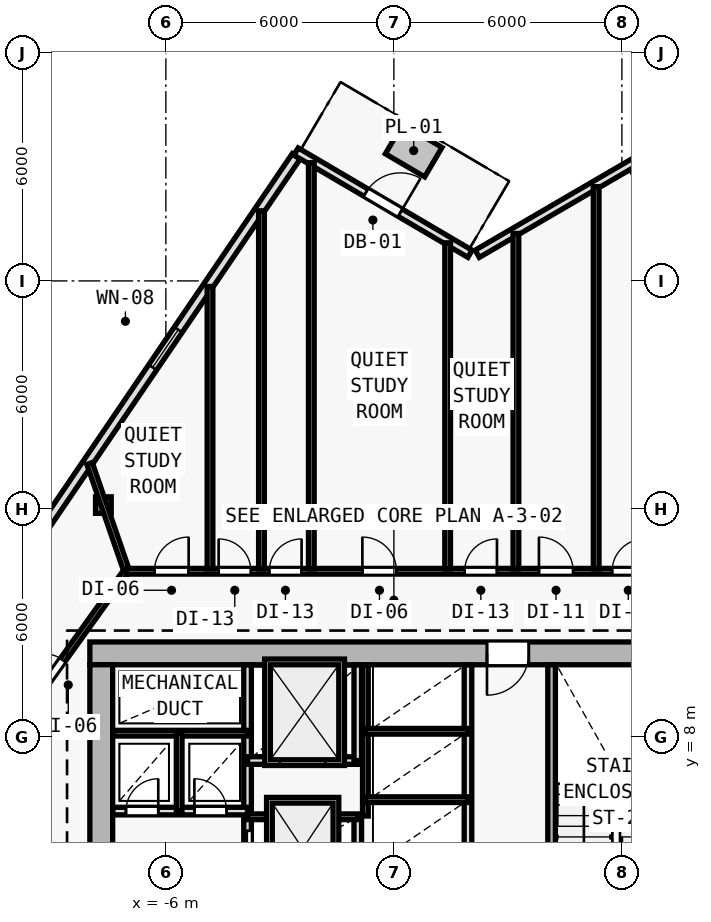
"""IFC4 building model, lengths in metres.
Left out: names, types, materials, properties, quantities, classifications, styles, units other than length and angle.
Written with IfcOpenShell. Run it as: python <this file> out.ifc"""

import sys

from ifc_helpers import new_model, si_unit, direction, frame, frame_2d, origin, origin_2d, place, context, subcontext, project, spatial, rectangle, i_section, extrude, element, fill, save


model = new_model("IFC4")
c1 = context("Model", 3, precision=1e-05, world=origin(), true_north=direction((0.0, 1.0)))
c2 = subcontext(c1, "Body", "Model", "MODEL_VIEW")
j1 = project(units=[si_unit("LENGTHUNIT", "METRE"), si_unit("PLANEANGLEUNIT", "RADIAN")], contexts=[c1])
p1 = place(None, origin())
s1 = spatial("IfcSite", under=j1, at=p1, CompositionType="ELEMENT")
p2 = place(p1, origin())
s2 = spatial("IfcBuilding", under=s1, at=p2, CompositionType="ELEMENT")
p3 = place(p2, frame((0.0, 0.0, 66.0)))
s3 = spatial("IfcBuildingStorey", under=s2, at=p3, CompositionType="ELEMENT", Elevation=66.0)
p4 = place(p3, frame((-7.7, 10.2, 0.0), z_axis=(0.0, 0.0, 1.0), x_axis=(1.0, 0.0, 0.0)))
e1 = element("IfcColumn", 1, at=p4, inside=s3, PredefinedType="COLUMN", context=c2, shape_type="SweptSolid", body=[
    extrude(i_section(OverallWidth=0.416, OverallDepth=0.446, WebThickness=0.025, FlangeThickness=0.04, FilletRadius=0.015, at=origin_2d()), origin(), (0.0, 0.0, 1.0), 3.6),
])
p5 = place(p3, frame((-7.644, 14.101, 0.006), z_axis=(0.008843162072, -0.002584924298, 0.999957557425), x_axis=(0.280566991813, 0.959834445675, 0.0)))
e2 = element("IfcColumn", 2, at=p5, inside=s3, PredefinedType="COLUMN", context=c2, shape_type="SweptSolid", body=[
    extrude(i_section(OverallWidth=0.412, OverallDepth=0.435, WebThickness=0.023, FlangeThickness=0.037, FilletRadius=0.015, at=origin_2d()), origin(), (0.0, 0.0, 1.0), 3.589),
])
p6 = place(p3, frame((6.328, 23.006, 0.0), z_axis=(0.0, 0.0, 1.0), x_axis=(0.511075811474, -0.859535639125, 0.0)))
e3 = element("IfcWall", 3, at=p6, inside=s3, PredefinedType="SOLIDWALL", context=c2, shape_type="SweptSolid", body=[
    extrude(rectangle(XDim=11.646, YDim=0.25, at=frame_2d((5.823, 0.0))), origin(), (0.0, 0.0, 1.0), 3.35),
])
p7 = place(p6, frame((5.023, 0.0, 0.62)))
e4 = element("IfcOpeningElement", 4, at=p7, cuts=e3, PredefinedType="OPENING", context=c2, shape_type="SweptSolid", body=[
    extrude(rectangle(XDim=1.6, YDim=2.1, at=frame_2d((0.8, 1.05))), frame((0.0, 0.135, 0.0), z_axis=(0.0, -1.0, 0.0), x_axis=(1.0, 0.0, 0.0)), (0.0, 0.0, 1.0), 0.27),
])
p8 = place(p3, frame((-9.451, 13.163, 0.0), z_axis=(0.0, 0.0, 1.0), x_axis=(0.562478152622, 0.826812147844, 0.0)))
e5 = element("IfcWall", 5, at=p8, inside=s3, PredefinedType="SOLIDWALL", context=c2, shape_type="SweptSolid", body=[
    extrude(rectangle(XDim=12.232, YDim=0.25, at=frame_2d((6.116, 0.0))), origin(), (0.0, 0.0, 1.0), 3.35),
])
p9 = place(p8, frame((5.516, 0.0, 0.62)))
e6 = element("IfcOpeningElement", 6, at=p9, cuts=e5, PredefinedType="OPENING", context=c2, shape_type="SweptSolid", body=[
    extrude(rectangle(XDim=1.2, YDim=1.8, at=frame_2d((0.6, 0.9))), frame((0.0, 0.135, 0.0), z_axis=(0.0, -1.0, 0.0), x_axis=(1.0, 0.0, 0.0)), (0.0, 0.0, 1.0), 0.27),
])
p10 = place(p3, frame((2.193, 20.713, 0.0), z_axis=(0.0, 0.0, 1.0), x_axis=(0.863964978951, 0.503551899159, 0.0)))
e7 = element("IfcWall", 7, at=p10, inside=s3, PredefinedType="SOLIDWALL", context=c2, shape_type="SweptSolid", body=[
    extrude(rectangle(XDim=4.805, YDim=0.22, at=frame_2d((2.402, 0.0))), origin(), (0.0, 0.0, 1.0), 3.35),
])
p11 = place(p3, frame((-2.572, 23.403, 0.0), z_axis=(0.0, 0.0, 1.0), x_axis=(0.862137551275, -0.506674296449, 0.0)))
e8 = element("IfcWall", 8, at=p11, inside=s3, PredefinedType="SOLIDWALL", context=c2, shape_type="SweptSolid", body=[
    extrude(rectangle(XDim=5.307, YDim=0.22, at=frame_2d((2.654, 0.0))), origin(), (0.0, 0.0, 1.0), 3.35),
])
p12 = place(p11, frame((2.128, 0.0, 0.0)))
e9 = element("IfcOpeningElement", 9, at=p12, cuts=e8, PredefinedType="OPENING", context=c2, shape_type="SweptSolid", body=[
    extrude(rectangle(XDim=1.05, YDim=2.15, at=frame_2d((0.525, 1.075))), frame((0.0, 0.12, 0.0), z_axis=(0.0, -1.0, 0.0), x_axis=(1.0, 0.0, 0.0)), (0.0, 0.0, 1.0), 0.24),
])
p13 = place(p3, frame((8.0, 10.2, 0.0), z_axis=(0.0, 0.0, 1.0), x_axis=(-1.0, 0.0, 0.0)))
e10 = element("IfcWall", 10, at=p13, inside=s3, PredefinedType="SHEAR", context=c2, shape_type="SweptSolid", body=[
    extrude(rectangle(XDim=16.0, YDim=0.6, at=frame_2d((8.0, 0.0))), origin(), (0.0, 0.0, 1.0), 3.35),
])
p14 = place(p13, frame((4.45, 0.0, 0.0)))
e11 = element("IfcOpeningElement", 11, at=p14, cuts=e10, PredefinedType="OPENING", context=c2, shape_type="SweptSolid", body=[
    extrude(rectangle(XDim=1.1, YDim=2.15, at=frame_2d((0.55, 1.075))), frame((0.0, 0.31, 0.0), z_axis=(0.0, -1.0, 0.0), x_axis=(1.0, 0.0, 0.0)), (0.0, 0.0, 1.0), 0.62),
])
p15 = place(p3, frame((-7.7, -9.1, 0.0), z_axis=(0.0, 0.0, 1.0), x_axis=(0.0, 1.0, 0.0)))
e12 = element("IfcWall", 12, at=p15, inside=s3, PredefinedType="SHEAR", context=c2, shape_type="SweptSolid", body=[
    extrude(rectangle(XDim=19.0, YDim=0.6, at=frame_2d((9.5, 0.0))), origin(), (0.0, 0.0, 1.0), 3.35),
])
p16 = place(p15, frame((12.65, 0.0, 0.0)))
e13 = element("IfcOpeningElement", 13, at=p16, cuts=e12, PredefinedType="OPENING", context=c2, shape_type="SweptSolid", body=[
    extrude(rectangle(XDim=1.1, YDim=2.15, at=frame_2d((0.55, 1.075))), frame((0.0, 0.31, 0.0), z_axis=(0.0, -1.0, 0.0), x_axis=(1.0, 0.0, 0.0)), (0.0, 0.0, 1.0), 0.62),
])
p17 = place(p3, frame((-3.85, 1.35, 0.0), z_axis=(0.0, 0.0, 1.0), x_axis=(0.0, 1.0, 0.0)))
e14 = element("IfcWall", 14, at=p17, inside=s3, PredefinedType="SOLIDWALL", context=c2, shape_type="SweptSolid", body=[
    extrude(rectangle(XDim=8.545, YDim=0.2, at=frame_2d((4.272, 0.0))), origin(), (0.0, 0.0, 1.0), 3.35),
])
p18 = place(p17, frame((1.5, 0.0, 0.0)))
e15 = element("IfcOpeningElement", 15, at=p18, cuts=e14, PredefinedType="OPENING", context=c2, shape_type="SweptSolid", body=[
    extrude(rectangle(XDim=1.0, YDim=2.15, at=frame_2d((0.5, 1.075))), frame((0.0, 0.11, 0.0), z_axis=(0.0, -1.0, 0.0), x_axis=(1.0, 0.0, 0.0)), (0.0, 0.0, 1.0), 0.22),
])
p19 = place(p17, frame((3.18, 0.0, 0.0)))
e16 = element("IfcOpeningElement", 16, at=p19, cuts=e14, PredefinedType="OPENING", context=c2, shape_type="SweptSolid", body=[
    extrude(rectangle(XDim=1.0, YDim=2.15, at=frame_2d((0.5, 1.075))), frame((0.0, 0.11, 0.0), z_axis=(0.0, -1.0, 0.0), x_axis=(1.0, 0.0, 0.0)), (0.0, 0.0, 1.0), 0.22),
])
p20 = place(p3, frame((-7.395, 6.05, 0.0), z_axis=(0.0, 0.0, 1.0), x_axis=(1.0, 0.0, 0.0)))
e17 = element("IfcWall", 17, at=p20, inside=s3, PredefinedType="SOLIDWALL", context=c2, shape_type="SweptSolid", body=[
    extrude(rectangle(XDim=3.545, YDim=0.2, at=frame_2d((1.772, 0.0))), origin(), (0.0, 0.0, 1.0), 3.35),
])
p21 = place(p20, frame((0.345, 0.0, 0.0)))
e18 = element("IfcOpeningElement", 18, at=p21, cuts=e17, PredefinedType="OPENING", context=c2, shape_type="SweptSolid", body=[
    extrude(rectangle(XDim=0.85, YDim=2.1, at=frame_2d((0.425, 1.05))), frame((0.0, 0.11, 0.0), z_axis=(0.0, -1.0, 0.0), x_axis=(1.0, 0.0, 0.0)), (0.0, 0.0, 1.0), 0.22),
])
p22 = place(p20, frame((2.145, 0.0, 0.0)))
e19 = element("IfcOpeningElement", 19, at=p22, cuts=e17, PredefinedType="OPENING", context=c2, shape_type="SweptSolid", body=[
    extrude(rectangle(XDim=0.85, YDim=2.1, at=frame_2d((0.425, 1.05))), frame((0.0, 0.11, 0.0), z_axis=(0.0, -1.0, 0.0), x_axis=(1.0, 0.0, 0.0)), (0.0, 0.0, 1.0), 0.22),
])
p23 = place(p3, frame((-7.395, 8.1, 0.0), z_axis=(0.0, 0.0, 1.0), x_axis=(1.0, 0.0, 0.0)))
e20 = element("IfcWall", 20, at=p23, inside=s3, PredefinedType="PARTITIONING", context=c2, shape_type="SweptSolid", body=[
    extrude(rectangle(XDim=3.545, YDim=0.15, at=frame_2d((1.772, 0.0))), origin(), (0.0, 0.0, 1.0), 3.35),
])
p24 = place(p3, frame((-5.65, 6.05, 0.0), z_axis=(0.0, 0.0, 1.0), x_axis=(0.0, 1.0, 0.0)))
e21 = element("IfcWall", 21, at=p24, inside=s3, PredefinedType="PARTITIONING", context=c2, shape_type="SweptSolid", body=[
    extrude(rectangle(XDim=2.05, YDim=0.15, at=frame_2d((1.025, 0.0))), origin(), (0.0, 0.0, 1.0), 3.35),
])
p25 = place(p3, frame((4.15, 2.75, 0.0), z_axis=(0.0, 0.0, 1.0), x_axis=(0.0, 1.0, 0.0)))
e22 = element("IfcWall", 22, at=p25, inside=s3, PredefinedType="SOLIDWALL", context=c2, shape_type="SweptSolid", body=[
    extrude(rectangle(XDim=7.15, YDim=0.2, at=frame_2d((3.575, 0.0))), origin(), (0.0, 0.0, 1.0), 3.35),
])
p26 = place(p25, frame((0.35, 0.0, 0.0)))
e23 = element("IfcOpeningElement", 23, at=p26, cuts=e22, PredefinedType="OPENING", context=c2, shape_type="SweptSolid", body=[
    extrude(rectangle(XDim=1.0, YDim=2.15, at=frame_2d((0.5, 1.075))), frame((0.0, 0.11, 0.0), z_axis=(0.0, -1.0, 0.0), x_axis=(1.0, 0.0, 0.0)), (0.0, 0.0, 1.0), 0.22),
])
p27 = place(p3, frame((-0.95, 2.65, 0.0), z_axis=(0.0, 0.0, 1.0), x_axis=(0.0, 1.0, 0.0)))
e24 = element("IfcWall", 24, at=p27, inside=s3, PredefinedType="SOLIDWALL", context=c2, shape_type="SweptSolid", body=[
    extrude(rectangle(XDim=3.27, YDim=0.2, at=frame_2d((1.635, 0.0))), origin(), (0.0, 0.0, 1.0), 3.35),
])
p28 = place(p3, frame((-3.85, 5.9, 0.0), z_axis=(0.0, 0.0, 1.0), x_axis=(1.0, 0.0, 0.0)))
e25 = element("IfcWall", 25, at=p28, inside=s3, PredefinedType="PARTITIONING", context=c2, shape_type="SweptSolid", body=[
    extrude(rectangle(XDim=2.9, YDim=0.15, at=frame_2d((1.45, 0.0))), origin(), (0.0, 0.0, 1.0), 3.35),
])
p29 = place(p3, frame((-3.85, 7.38, 0.0), z_axis=(0.0, 0.0, 1.0), x_axis=(1.0, 0.0, 0.0)))
e26 = element("IfcWall", 26, at=p29, inside=s3, PredefinedType="SOLIDWALL", context=c2, shape_type="SweptSolid", body=[
    extrude(rectangle(XDim=2.9, YDim=0.2, at=frame_2d((1.45, 0.0))), origin(), (0.0, 0.0, 1.0), 3.35),
])
p30 = place(p29, frame((0.85, 0.0, 0.0)))
e27 = element("IfcOpeningElement", 27, at=p30, cuts=e26, PredefinedType="OPENING", context=c2, shape_type="SweptSolid", body=[
    extrude(rectangle(XDim=1.2, YDim=2.2, at=frame_2d((0.6, 1.1))), frame((0.0, 0.11, 0.0), z_axis=(0.0, -1.0, 0.0), x_axis=(1.0, 0.0, 0.0)), (0.0, 0.0, 1.0), 0.22),
])
p31 = place(p3, frame((-0.95, 7.38, 0.0), z_axis=(0.0, 0.0, 1.0), x_axis=(0.0, 1.0, 0.0)))
e28 = element("IfcWall", 28, at=p31, inside=s3, PredefinedType="SOLIDWALL", context=c2, shape_type="SweptSolid", body=[
    extrude(rectangle(XDim=2.515, YDim=0.2, at=frame_2d((1.258, 0.0))), origin(), (0.0, 0.0, 1.0), 3.35),
])
p32 = place(p3, frame((1.95, 2.65, 0.0), z_axis=(0.0, 0.0, 1.0), x_axis=(0.0, 1.0, 0.0)))
e29 = element("IfcWall", 29, at=p32, inside=s3, PredefinedType="SOLIDWALL", context=c2, shape_type="SweptSolid", body=[
    extrude(rectangle(XDim=7.245, YDim=0.2, at=frame_2d((3.623, 0.0))), origin(), (0.0, 0.0, 1.0), 3.35),
])
p33 = place(p3, frame((-0.75, 5.92, 0.0), z_axis=(0.0, 0.0, 1.0), x_axis=(0.0, 1.0, 0.0)))
e30 = element("IfcWall", 30, at=p33, inside=s3, PredefinedType="PARTITIONING", context=c2, shape_type="SweptSolid", body=[
    extrude(rectangle(XDim=3.975, YDim=0.15, at=frame_2d((1.988, 0.0))), origin(), (0.0, 0.0, 1.0), 3.35),
])
for number, where, z_axis, x_axis in (
    (31, (-0.75, 6.35, 0.0), (0.0, 0.0, 1.0), (1.0, 0.0, 0.0)),
    (32, (-0.75, 8.15, 0.0), (0.0, 0.0, 1.0), (1.0, 0.0, 0.0)),
):
    element("IfcWall", number, at=place(p3, frame(where, z_axis=z_axis, x_axis=x_axis)), inside=s3, PredefinedType="PARTITIONING", context=c2, shape_type="SweptSolid", body=[
        extrude(rectangle(XDim=2.7, YDim=0.15, at=frame_2d((1.35, 0.0))), origin(), (0.0, 0.0, 1.0), 3.35),
    ])
p34 = place(p3, frame((-9.86, 8.426, 0.0), z_axis=(0.0, 0.0, 1.0), x_axis=(0.582449511476, 0.812866881218, 0.0)))
e33 = element("IfcWall", 33, at=p34, inside=s3, PredefinedType="PARTITIONING", context=c2, shape_type="SweptSolid", body=[
    extrude(rectangle(XDim=4.84, YDim=0.15, at=frame_2d((2.42, 0.0))), origin(), (0.0, 0.0, 1.0), 2.725),
])
p35 = place(p34, frame((1.07, 0.0, 0.0)))
e34 = element("IfcOpeningElement", 34, at=p35, cuts=e33, PredefinedType="OPENING", context=c2, shape_type="SweptSolid", body=[
    extrude(rectangle(XDim=0.9, YDim=2.1, at=frame_2d((0.45, 1.05))), frame((0.0, 0.085, 0.0), z_axis=(0.0, -1.0, 0.0), x_axis=(1.0, 0.0, 0.0)), (0.0, 0.0, 1.0), 0.17),
])
p36 = place(p3, frame((-7.041, 12.36, 0.0), z_axis=(0.0, 0.0, 1.0), x_axis=(1.0, 0.0, 0.0)))
e35 = element("IfcWall", 35, at=p36, inside=s3, PredefinedType="PARTITIONING", context=c2, shape_type="SweptSolid", body=[
    extrude(rectangle(XDim=14.082, YDim=0.15, at=frame_2d((7.041, 0.0))), origin(), (0.0, 0.0, 1.0), 3.35),
])
p37 = place(p36, frame((12.784, 0.0, 0.0)))
e36 = element("IfcOpeningElement", 36, at=p37, cuts=e35, PredefinedType="OPENING", context=c2, shape_type="SweptSolid", body=[
    extrude(rectangle(XDim=0.85, YDim=2.1, at=frame_2d((0.425, 1.05))), frame((0.0, 0.085, 0.0), z_axis=(0.0, -1.0, 0.0), x_axis=(1.0, 0.0, 0.0)), (0.0, 0.0, 1.0), 0.17),
])
p38 = place(p36, frame((10.858, 0.0, 0.0)))
e37 = element("IfcOpeningElement", 37, at=p38, cuts=e35, PredefinedType="OPENING", context=c2, shape_type="SweptSolid", body=[
    extrude(rectangle(XDim=0.9, YDim=2.1, at=frame_2d((0.45, 1.05))), frame((0.0, 0.085, 0.0), z_axis=(0.0, -1.0, 0.0), x_axis=(1.0, 0.0, 0.0)), (0.0, 0.0, 1.0), 0.17),
])
p39 = place(p36, frame((8.904, 0.0, 0.0)))
e38 = element("IfcOpeningElement", 38, at=p39, cuts=e35, PredefinedType="OPENING", context=c2, shape_type="SweptSolid", body=[
    extrude(rectangle(XDim=0.85, YDim=2.1, at=frame_2d((0.425, 1.05))), frame((0.0, 0.085, 0.0), z_axis=(0.0, -1.0, 0.0), x_axis=(1.0, 0.0, 0.0)), (0.0, 0.0, 1.0), 0.17),
])
p40 = place(p36, frame((6.212, 0.0, 0.0)))
e39 = element("IfcOpeningElement", 39, at=p40, cuts=e35, PredefinedType="OPENING", context=c2, shape_type="SweptSolid", body=[
    extrude(rectangle(XDim=0.9, YDim=2.1, at=frame_2d((0.45, 1.05))), frame((0.0, 0.085, 0.0), z_axis=(0.0, -1.0, 0.0), x_axis=(1.0, 0.0, 0.0)), (0.0, 0.0, 1.0), 0.17),
])
p41 = place(p36, frame((3.763, 0.0, 0.0)))
e40 = element("IfcOpeningElement", 40, at=p41, cuts=e35, PredefinedType="OPENING", context=c2, shape_type="SweptSolid", body=[
    extrude(rectangle(XDim=0.85, YDim=2.1, at=frame_2d((0.425, 1.05))), frame((0.0, 0.085, 0.0), z_axis=(0.0, -1.0, 0.0), x_axis=(1.0, 0.0, 0.0)), (0.0, 0.0, 1.0), 0.17),
])
p42 = place(p36, frame((2.429, 0.0, 0.0)))
e41 = element("IfcOpeningElement", 41, at=p42, cuts=e35, PredefinedType="OPENING", context=c2, shape_type="SweptSolid", body=[
    extrude(rectangle(XDim=0.85, YDim=2.1, at=frame_2d((0.425, 1.05))), frame((0.0, 0.085, 0.0), z_axis=(0.0, -1.0, 0.0), x_axis=(1.0, 0.0, 0.0)), (0.0, 0.0, 1.0), 0.17),
])
p43 = place(p36, frame((0.74, 0.0, 0.0)))
e42 = element("IfcOpeningElement", 42, at=p43, cuts=e35, PredefinedType="OPENING", context=c2, shape_type="SweptSolid", body=[
    extrude(rectangle(XDim=0.9, YDim=2.1, at=frame_2d((0.45, 1.05))), frame((0.0, 0.085, 0.0), z_axis=(0.0, -1.0, 0.0), x_axis=(1.0, 0.0, 0.0)), (0.0, 0.0, 1.0), 0.17),
])
p44 = place(p3, frame((-7.047, 12.412, 0.0), z_axis=(0.0, 0.0, 1.0), x_axis=(-0.326108195871, 0.945332451884, 0.0)))
e43 = element("IfcWall", 43, at=p44, inside=s3, PredefinedType="PARTITIONING", context=c2, shape_type="SweptSolid", body=[
    extrude(rectangle(XDim=2.945, YDim=0.15, at=frame_2d((1.473, 0.0))), origin(), (0.0, 0.0, 1.0), 2.725),
])
p45 = place(p3, frame((1.414, 12.42, 0.0), z_axis=(0.0, 0.0, 1.0), x_axis=(0.0, 1.0, 0.0)))
e44 = element("IfcWall", 44, at=p45, inside=s3, PredefinedType="PARTITIONING", context=c2, shape_type="SweptSolid", body=[
    extrude(rectangle(XDim=8.582, YDim=0.15, at=frame_2d((4.291, 0.0))), origin(), (0.0, 0.0, 1.0), 2.735),
])
p46 = place(p3, frame((5.323, 12.42, 0.0), z_axis=(0.0, 0.0, 1.0), x_axis=(0.0, 1.0, 0.0)))
e45 = element("IfcWall", 45, at=p46, inside=s3, PredefinedType="PARTITIONING", context=c2, shape_type="SweptSolid", body=[
    extrude(rectangle(XDim=10.06, YDim=0.15, at=frame_2d((5.03, 0.0))), origin(), (0.0, 0.0, 1.0), 2.735),
])
p47 = place(p3, frame((-3.485, 12.42, 0.0), z_axis=(0.0, 0.0, 1.0), x_axis=(0.0, 1.0, 0.0)))
e46 = element("IfcWall", 46, at=p47, inside=s3, PredefinedType="PARTITIONING", context=c2, shape_type="SweptSolid", body=[
    extrude(rectangle(XDim=9.425, YDim=0.15, at=frame_2d((4.712, 0.0))), origin(), (0.0, 0.0, 1.0), 2.735),
])
p48 = place(p3, frame((3.211, 12.42, 0.0), z_axis=(0.0, 0.0, 1.0), x_axis=(0.0, 1.0, 0.0)))
e47 = element("IfcWall", 47, at=p48, inside=s3, PredefinedType="PARTITIONING", context=c2, shape_type="SweptSolid", body=[
    extrude(rectangle(XDim=8.829, YDim=0.15, at=frame_2d((4.415, 0.0))), origin(), (0.0, 0.0, 1.0), 2.735),
])
p49 = place(p3, frame((-2.173, 12.42, 0.0), z_axis=(0.0, 0.0, 1.0), x_axis=(0.0, 1.0, 0.0)))
e48 = element("IfcWall", 48, at=p49, inside=s3, PredefinedType="PARTITIONING", context=c2, shape_type="SweptSolid", body=[
    extrude(rectangle(XDim=10.69, YDim=0.15, at=frame_2d((5.345, 0.0))), origin(), (0.0, 0.0, 1.0), 2.735),
])
p50 = place(p3, frame((-4.839, 12.42, 0.0), z_axis=(0.0, 0.0, 1.0), x_axis=(0.0, 1.0, 0.0)))
e49 = element("IfcWall", 49, at=p50, inside=s3, PredefinedType="PARTITIONING", context=c2, shape_type="SweptSolid", body=[
    extrude(rectangle(XDim=7.434, YDim=0.15, at=frame_2d((3.717, 0.0))), origin(), (0.0, 0.0, 1.0), 2.735),
])
p51 = place(p9, origin())
e50 = element("IfcWindow", 50, at=p51, inside=s3, PartitioningType="SINGLE_PANEL", PredefinedType="WINDOW", context=c2, shape_type="SweptSolid", body=[
    extrude(rectangle(XDim=1.2, YDim=1.8, at=frame_2d((0.6, 0.9))), frame((0.0, 0.03, 0.0), z_axis=(0.0, -1.0, 0.0), x_axis=(1.0, 0.0, 0.0)), (0.0, 0.0, 1.0), 0.06),
])
fill(e6, e50)
p52 = place(p12, origin())
e51 = element("IfcDoor", 51, at=p52, inside=s3, OperationType="SINGLE_SWING_RIGHT", PredefinedType="DOOR", context=c2, shape_type="SweptSolid", body=[
    extrude(rectangle(XDim=1.05, YDim=2.15, at=frame_2d((0.525, 1.075))), frame((0.0, 0.025, 0.0), z_axis=(0.0, -1.0, 0.0), x_axis=(1.0, 0.0, 0.0)), (0.0, 0.0, 1.0), 0.05),
])
fill(e9, e51)
p53 = place(p14, origin())
e52 = element("IfcDoor", 52, at=p53, inside=s3, OperationType="SINGLE_SWING_RIGHT", PredefinedType="DOOR", context=c2, shape_type="SweptSolid", body=[
    extrude(rectangle(XDim=1.1, YDim=2.15, at=frame_2d((0.55, 1.075))), frame((0.0, 0.025, 0.0), z_axis=(0.0, -1.0, 0.0), x_axis=(1.0, 0.0, 0.0)), (0.0, 0.0, 1.0), 0.05),
])
fill(e11, e52)
p54 = place(p21, origin())
e53 = element("IfcDoor", 53, at=p54, inside=s3, OperationType="SINGLE_SWING_RIGHT", PredefinedType="DOOR", context=c2, shape_type="SweptSolid", body=[
    extrude(rectangle(XDim=0.85, YDim=2.1, at=frame_2d((0.425, 1.05))), frame((0.0, 0.025, 0.0), z_axis=(0.0, -1.0, 0.0), x_axis=(1.0, 0.0, 0.0)), (0.0, 0.0, 1.0), 0.05),
])
fill(e18, e53)
p55 = place(p22, origin())
e54 = element("IfcDoor", 54, at=p55, inside=s3, OperationType="SINGLE_SWING_LEFT", PredefinedType="DOOR", context=c2, shape_type="SweptSolid", body=[
    extrude(rectangle(XDim=0.85, YDim=2.1, at=frame_2d((0.425, 1.05))), frame((0.0, 0.025, 0.0), z_axis=(0.0, -1.0, 0.0), x_axis=(1.0, 0.0, 0.0)), (0.0, 0.0, 1.0), 0.05),
])
fill(e19, e54)
p56 = place(p30, origin())
e55 = element("IfcDoor", 55, at=p56, inside=s3, OperationType="DOUBLE_DOOR_SLIDING", PredefinedType="DOOR", context=c2, shape_type="SweptSolid", body=[
    extrude(rectangle(XDim=1.2, YDim=2.2, at=frame_2d((0.6, 1.1))), frame((0.0, 0.025, 0.0), z_axis=(0.0, -1.0, 0.0), x_axis=(1.0, 0.0, 0.0)), (0.0, 0.0, 1.0), 0.05),
])
fill(e27, e55)
p57 = place(p19, origin())
e56 = element("IfcDoor", 56, at=p57, inside=s3, OperationType="DOUBLE_DOOR_SLIDING", PredefinedType="DOOR", context=c2, shape_type="SweptSolid", body=[
    extrude(rectangle(XDim=1.0, YDim=2.15, at=frame_2d((0.5, 1.075))), frame((0.0, 0.025, 0.0), z_axis=(0.0, -1.0, 0.0), x_axis=(1.0, 0.0, 0.0)), (0.0, 0.0, 1.0), 0.05),
])
fill(e16, e56)
p58 = place(p37, origin())
e57 = element("IfcDoor", 57, at=p58, inside=s3, OperationType="SINGLE_SWING_RIGHT", PredefinedType="DOOR", context=c2, shape_type="SweptSolid", body=[
    extrude(rectangle(XDim=0.85, YDim=2.1, at=frame_2d((0.425, 1.05))), frame((0.0, 0.025, 0.0), z_axis=(0.0, -1.0, 0.0), x_axis=(1.0, 0.0, 0.0)), (0.0, 0.0, 1.0), 0.05),
])
fill(e36, e57)
p59 = place(p38, origin())
e58 = element("IfcDoor", 58, at=p59, inside=s3, OperationType="SINGLE_SWING_LEFT", PredefinedType="DOOR", context=c2, shape_type="SweptSolid", body=[
    extrude(rectangle(XDim=0.9, YDim=2.1, at=frame_2d((0.45, 1.05))), frame((0.0, 0.025, 0.0), z_axis=(0.0, -1.0, 0.0), x_axis=(1.0, 0.0, 0.0)), (0.0, 0.0, 1.0), 0.05),
])
fill(e37, e58)
p60 = place(p39, origin())
e59 = element("IfcDoor", 59, at=p60, inside=s3, OperationType="SINGLE_SWING_RIGHT", PredefinedType="DOOR", context=c2, shape_type="SweptSolid", body=[
    extrude(rectangle(XDim=0.85, YDim=2.1, at=frame_2d((0.425, 1.05))), frame((0.0, 0.025, 0.0), z_axis=(0.0, -1.0, 0.0), x_axis=(1.0, 0.0, 0.0)), (0.0, 0.0, 1.0), 0.05),
])
fill(e38, e59)
p61 = place(p40, origin())
e60 = element("IfcDoor", 60, at=p61, inside=s3, OperationType="SINGLE_SWING_LEFT", PredefinedType="DOOR", context=c2, shape_type="SweptSolid", body=[
    extrude(rectangle(XDim=0.9, YDim=2.1, at=frame_2d((0.45, 1.05))), frame((0.0, 0.025, 0.0), z_axis=(0.0, -1.0, 0.0), x_axis=(1.0, 0.0, 0.0)), (0.0, 0.0, 1.0), 0.05),
])
fill(e39, e60)
p62 = place(p41, origin())
e61 = element("IfcDoor", 61, at=p62, inside=s3, OperationType="SINGLE_SWING_RIGHT", PredefinedType="DOOR", context=c2, shape_type="SweptSolid", body=[
    extrude(rectangle(XDim=0.85, YDim=2.1, at=frame_2d((0.425, 1.05))), frame((0.0, 0.025, 0.0), z_axis=(0.0, -1.0, 0.0), x_axis=(1.0, 0.0, 0.0)), (0.0, 0.0, 1.0), 0.05),
])
fill(e40, e61)
p63 = place(p42, origin())
e62 = element("IfcDoor", 62, at=p63, inside=s3, OperationType="SINGLE_SWING_LEFT", PredefinedType="DOOR", context=c2, shape_type="SweptSolid", body=[
    extrude(rectangle(XDim=0.85, YDim=2.1, at=frame_2d((0.425, 1.05))), frame((0.0, 0.025, 0.0), z_axis=(0.0, -1.0, 0.0), x_axis=(1.0, 0.0, 0.0)), (0.0, 0.0, 1.0), 0.05),
])
fill(e41, e62)
p64 = place(p43, origin())
e63 = element("IfcDoor", 63, at=p64, inside=s3, OperationType="SINGLE_SWING_RIGHT", PredefinedType="DOOR", context=c2, shape_type="SweptSolid", body=[
    extrude(rectangle(XDim=0.9, YDim=2.1, at=frame_2d((0.45, 1.05))), frame((0.0, 0.025, 0.0), z_axis=(0.0, -1.0, 0.0), x_axis=(1.0, 0.0, 0.0)), (0.0, 0.0, 1.0), 0.05),
])
fill(e42, e63)
p65 = place(p35, origin())
e64 = element("IfcDoor", 64, at=p65, inside=s3, OperationType="SINGLE_SWING_LEFT", PredefinedType="DOOR", context=c2, shape_type="SweptSolid", body=[
    extrude(rectangle(XDim=0.9, YDim=2.1, at=frame_2d((0.45, 1.05))), frame((0.0, 0.025, 0.0), z_axis=(0.0, -1.0, 0.0), x_axis=(1.0, 0.0, 0.0)), (0.0, 0.0, 1.0), 0.05),
])
fill(e34, e64)
save(model, sys.argv[1])
